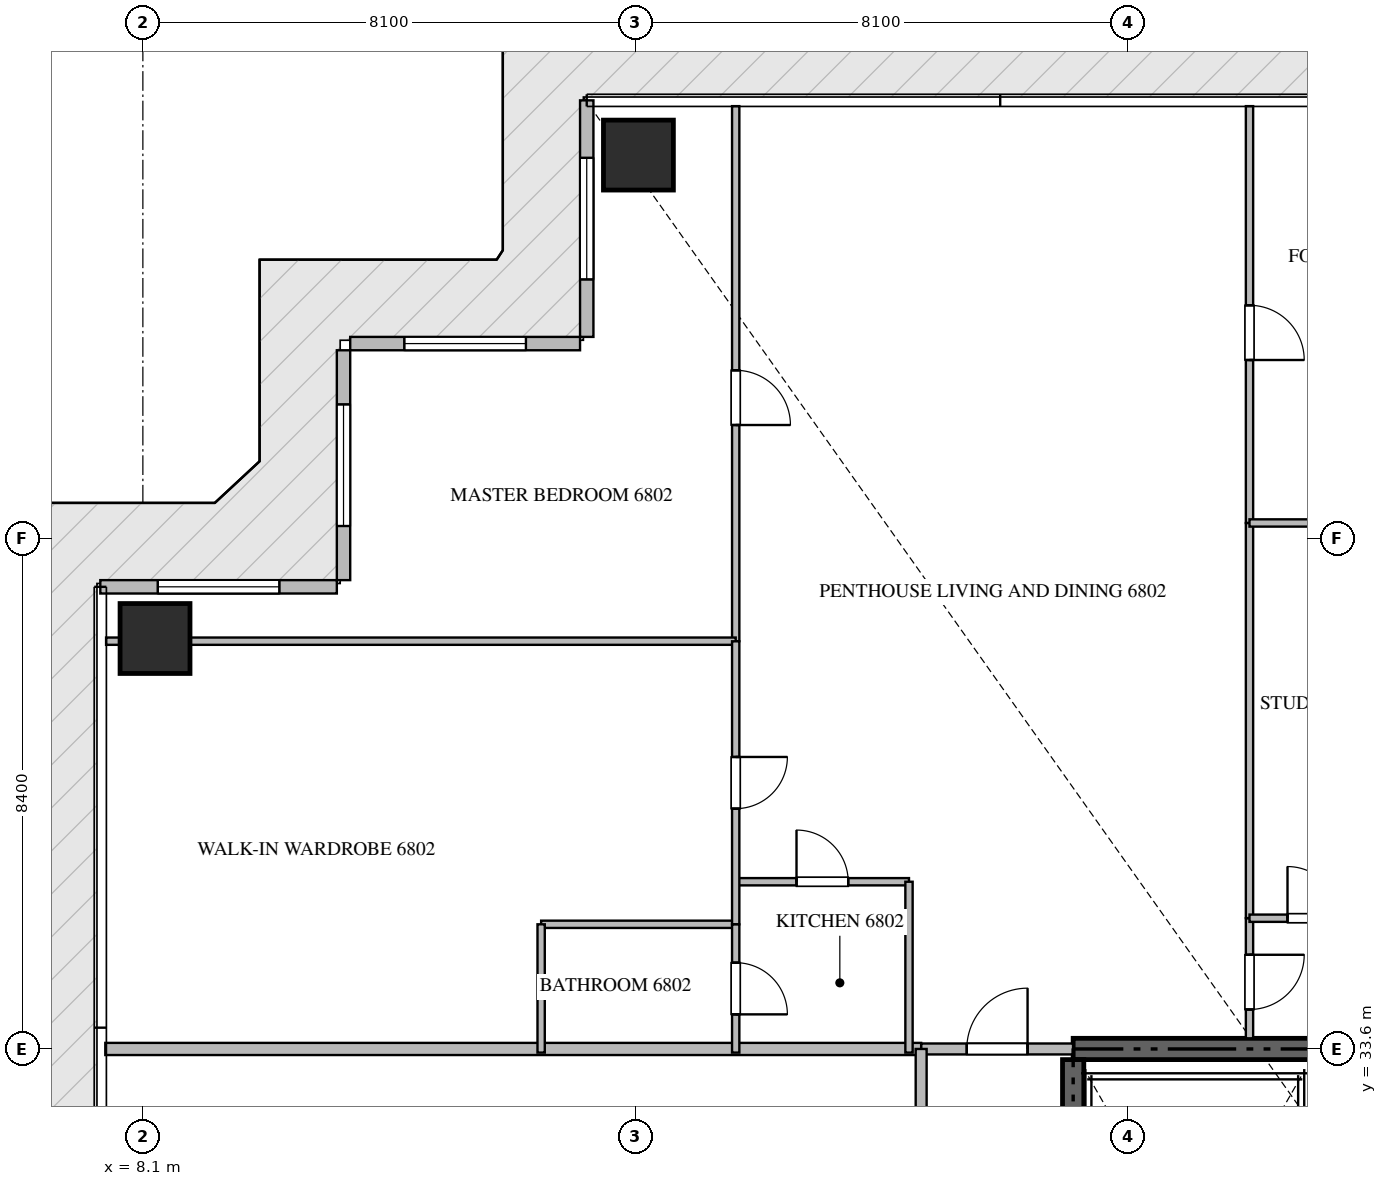
"""IFC4 building model, lengths in metres.
Left out: names, types, materials, properties, quantities, classifications, styles, units other than length and angle.
Written with IfcOpenShell. Run it as: python <this file> out.ifc"""

import sys

from ifc_helpers import new_model, si_unit, direction, frame, frame_2d, origin, origin_2d, place, context, subcontext, project, spatial, rectangle, extrude, source, transform, mapped, element, fill, save


model = new_model("IFC4")
c1 = context("Model", 3, precision=1e-05, world=origin(), true_north=direction((0.0, 1.0)))
c2 = subcontext(c1, "Body", "Model", "MODEL_VIEW")
j1 = project(units=[si_unit("LENGTHUNIT", "METRE"), si_unit("PLANEANGLEUNIT", "RADIAN")], contexts=[c1])
p1 = place(None, origin())
s1 = spatial("IfcSite", under=j1, at=p1, CompositionType="ELEMENT")
p2 = place(p1, origin())
s2 = spatial("IfcBuilding", under=s1, at=p2, CompositionType="ELEMENT")
p3 = place(p2, frame((0.0, 0.0, 272.05)))
s3 = spatial("IfcBuildingStorey", under=s2, at=p3, CompositionType="ELEMENT", Elevation=272.05)
p4 = place(p3, frame((41.4, 33.6, -0.26), z_axis=(0.0, 0.0, 1.0), x_axis=(-1.0, 0.0, 0.0)))
e1 = element("IfcWall", 1, at=p4, inside=s3, PredefinedType="SHEAR", context=c2, shape_type="SweptSolid", body=[
    extrude(rectangle(XDim=18.0, YDim=0.35, at=frame_2d((9.0, 0.0))), origin(), (0.0, 0.0, 1.0), 3.848),
])
p5 = place(p3, frame((23.4, 24.25, -0.26), z_axis=(0.0, 0.0, 1.0), x_axis=(0.0, 1.0, 0.0)))
e2 = element("IfcWall", 2, at=p5, inside=s3, PredefinedType="SHEAR", context=c2, shape_type="SweptSolid", body=[
    extrude(rectangle(XDim=9.175, YDim=0.35, at=frame_2d((4.587, 0.0))), origin(), (0.0, 0.0, 1.0), 3.848),
])
m1 = source(origin(), c2, "Body", "SweptSolid", [
    extrude(rectangle(XDim=1.15, YDim=1.15, at=origin_2d()), origin(), (0.0, 0.0, 1.0), 3.85),
])
for number, where, z_axis, x_axis in (
    (3, (16.25, 48.3, -0.26), (0.0, 0.0, 1.0), (1.0, 0.0, 0.0)),
    (4, (8.3, 40.35, -0.26), (0.0, 0.0, 1.0), (1.0, 0.0, 0.0)),
):
    element("IfcColumn", number, at=place(p3, frame(where, z_axis=z_axis, x_axis=x_axis)), inside=s3, PredefinedType="COLUMN", context=c2, shape_type="MappedRepresentation", body=[
        mapped(m1, transform((0.0, 0.0, 0.0), scale=1.0)),
    ])
p6 = place(p3, frame((15.4, 49.2, 0.0), z_axis=(0.0, 0.0, 1.0), x_axis=(0.0, -1.0, 0.0)))
e5 = element("IfcWall", 5, at=p6, inside=s3, PredefinedType="ELEMENTEDWALL", context=c2, shape_type="SweptSolid", body=[
    extrude(rectangle(XDim=3.89, YDim=0.22, at=frame_2d((1.945, 0.0))), origin(), (0.0, 0.0, 1.0), 3.575),
])
p7 = place(p6, frame((0.945, 0.0, 0.65)))
e6 = element("IfcOpeningElement", 6, at=p7, cuts=e5, PredefinedType="OPENING", context=c2, shape_type="SweptSolid", body=[
    extrude(rectangle(XDim=2.0, YDim=2.2, at=frame_2d((1.0, 1.1))), frame((0.0, 0.12, 0.0), z_axis=(0.0, -1.0, 0.0), x_axis=(1.0, 0.0, 0.0)), (0.0, 0.0, 1.0), 0.24),
])
p8 = place(p3, frame((15.29, 45.2, 0.0), z_axis=(0.0, 0.0, 1.0), x_axis=(-1.0, 0.0, 0.0)))
e7 = element("IfcWall", 7, at=p8, inside=s3, PredefinedType="ELEMENTEDWALL", context=c2, shape_type="SweptSolid", body=[
    extrude(rectangle(XDim=3.78, YDim=0.22, at=frame_2d((1.89, 0.0))), origin(), (0.0, 0.0, 1.0), 3.575),
])
p9 = place(p8, frame((0.89, 0.0, 0.65)))
e8 = element("IfcOpeningElement", 8, at=p9, cuts=e7, PredefinedType="OPENING", context=c2, shape_type="SweptSolid", body=[
    extrude(rectangle(XDim=2.0, YDim=2.2, at=frame_2d((1.0, 1.1))), frame((0.0, 0.12, 0.0), z_axis=(0.0, -1.0, 0.0), x_axis=(1.0, 0.0, 0.0)), (0.0, 0.0, 1.0), 0.24),
])
p10 = place(p3, frame((11.4, 45.09, 0.0), z_axis=(0.0, 0.0, 1.0), x_axis=(0.0, -1.0, 0.0)))
e9 = element("IfcWall", 9, at=p10, inside=s3, PredefinedType="ELEMENTEDWALL", context=c2, shape_type="SweptSolid", body=[
    extrude(rectangle(XDim=3.78, YDim=0.22, at=frame_2d((1.89, 0.0))), origin(), (0.0, 0.0, 1.0), 3.575),
])
p11 = place(p10, frame((0.89, 0.0, 0.65)))
e10 = element("IfcOpeningElement", 10, at=p11, cuts=e9, PredefinedType="OPENING", context=c2, shape_type="SweptSolid", body=[
    extrude(rectangle(XDim=2.0, YDim=2.2, at=frame_2d((1.0, 1.1))), frame((0.0, 0.12, 0.0), z_axis=(0.0, -1.0, 0.0), x_axis=(1.0, 0.0, 0.0)), (0.0, 0.0, 1.0), 0.24),
])
p12 = place(p3, frame((11.29, 41.2, 0.0), z_axis=(0.0, 0.0, 1.0), x_axis=(-1.0, 0.0, 0.0)))
e11 = element("IfcWall", 11, at=p12, inside=s3, PredefinedType="ELEMENTEDWALL", context=c2, shape_type="SweptSolid", body=[
    extrude(rectangle(XDim=3.89, YDim=0.22, at=frame_2d((1.945, 0.0))), origin(), (0.0, 0.0, 1.0), 3.575),
])
p13 = place(p12, frame((0.945, 0.0, 0.65)))
e12 = element("IfcOpeningElement", 12, at=p13, cuts=e11, PredefinedType="OPENING", context=c2, shape_type="SweptSolid", body=[
    extrude(rectangle(XDim=2.0, YDim=2.2, at=frame_2d((1.0, 1.1))), frame((0.0, 0.12, 0.0), z_axis=(0.0, -1.0, 0.0), x_axis=(1.0, 0.0, 0.0)), (0.0, 0.0, 1.0), 0.24),
])
p14 = place(p3, frame((7.482, 33.6, 0.0), z_axis=(0.0, 0.0, 1.0), x_axis=(1.0, 0.0, 0.0)))
e13 = element("IfcWall", 13, at=p14, inside=s3, PredefinedType="PARTITIONING", context=c2, shape_type="SweptSolid", body=[
    extrude(rectangle(XDim=13.418, YDim=0.2, at=frame_2d((6.709, 0.0))), origin(), (0.0, 0.0, 1.0), 3.59),
])
p15 = place(p3, frame((20.902, 33.6, 0.0), z_axis=(0.0, 0.0, 1.0), x_axis=(1.0, 0.0, 0.0)))
e14 = element("IfcWall", 14, at=p15, inside=s3, PredefinedType="PARTITIONING", context=c2, shape_type="SweptSolid", body=[
    extrude(rectangle(XDim=2.496, YDim=0.18, at=frame_2d((1.248, 0.0))), origin(), (0.0, 0.0, 1.0), 3.59),
])
p16 = place(p15, frame((0.748, 0.0, 0.0)))
e15 = element("IfcOpeningElement", 15, at=p16, cuts=e14, PredefinedType="OPENING", context=c2, shape_type="SweptSolid", body=[
    extrude(rectangle(XDim=1.0, YDim=2.15, at=frame_2d((0.5, 1.075))), frame((0.0, 0.1, 0.0), z_axis=(0.0, -1.0, 0.0), x_axis=(1.0, 0.0, 0.0)), (0.0, 0.0, 1.0), 0.2),
])
p17 = place(p3, frame((20.9, 16.8, 0.0), z_axis=(0.0, 0.0, 1.0), x_axis=(0.0, 1.0, 0.0)))
e16 = element("IfcWall", 16, at=p17, inside=s3, PredefinedType="PARTITIONING", context=c2, shape_type="SweptSolid", body=[
    extrude(rectangle(XDim=16.8, YDim=0.18, at=frame_2d((8.4, 0.0))), origin(), (0.0, 0.0, 1.0), 3.59),
])
p18 = place(p17, frame((3.018, 0.0, 0.0)))
e17 = element("IfcOpeningElement", 17, at=p18, cuts=e16, PredefinedType="OPENING", context=c2, shape_type="SweptSolid", body=[
    extrude(rectangle(XDim=1.0, YDim=2.15, at=frame_2d((0.5, 1.075))), frame((0.0, 0.1, 0.0), z_axis=(0.0, -1.0, 0.0), x_axis=(1.0, 0.0, 0.0)), (0.0, 0.0, 1.0), 0.2),
])
p19 = place(p17, frame((9.18, 0.0, 0.0)))
e18 = element("IfcOpeningElement", 18, at=p19, cuts=e16, PredefinedType="OPENING", context=c2, shape_type="SweptSolid", body=[
    extrude(rectangle(XDim=1.0, YDim=2.15, at=frame_2d((0.5, 1.075))), frame((0.0, 0.1, 0.0), z_axis=(0.0, -1.0, 0.0), x_axis=(1.0, 0.0, 0.0)), (0.0, 0.0, 1.0), 0.2),
])
p20 = place(p17, frame((14.5, 0.0, 0.0)))
e19 = element("IfcOpeningElement", 19, at=p20, cuts=e16, PredefinedType="OPENING", context=c2, shape_type="SweptSolid", body=[
    extrude(rectangle(XDim=1.0, YDim=2.15, at=frame_2d((0.5, 1.075))), frame((0.0, 0.1, 0.0), z_axis=(0.0, -1.0, 0.0), x_axis=(1.0, 0.0, 0.0)), (0.0, 0.0, 1.0), 0.2),
])
p21 = place(p3, frame((17.85, 36.35, 0.0), z_axis=(0.0, 0.0, 1.0), x_axis=(1.0, 0.0, 0.0)))
e20 = element("IfcWall", 20, at=p21, inside=s3, PredefinedType="PARTITIONING", context=c2, shape_type="SweptSolid", body=[
    extrude(rectangle(XDim=2.85, YDim=0.12, at=frame_2d((1.425, 0.0))), origin(), (0.0, 0.0, 1.0), 3.59),
])
p22 = place(p21, frame((1.0, 0.0, 0.0)))
e21 = element("IfcOpeningElement", 21, at=p22, cuts=e20, PredefinedType="OPENING", context=c2, shape_type="SweptSolid", body=[
    extrude(rectangle(XDim=0.85, YDim=2.1, at=frame_2d((0.425, 1.05))), frame((0.0, 0.07, 0.0), z_axis=(0.0, -1.0, 0.0), x_axis=(1.0, 0.0, 0.0)), (0.0, 0.0, 1.0), 0.14),
])
p23 = place(p3, frame((20.7, 36.35, 0.0), z_axis=(0.0, 0.0, 1.0), x_axis=(0.0, -1.0, 0.0)))
e22 = element("IfcWall", 22, at=p23, inside=s3, PredefinedType="PARTITIONING", context=c2, shape_type="SweptSolid", body=[
    extrude(rectangle(XDim=2.81, YDim=0.12, at=frame_2d((1.405, 0.0))), origin(), (0.0, 0.0, 1.0), 3.59),
])
p24 = place(p3, frame((17.85, 49.105, 0.0), z_axis=(0.0, 0.0, 1.0), x_axis=(0.0, -1.0, 0.0)))
e23 = element("IfcWall", 23, at=p24, inside=s3, PredefinedType="PARTITIONING", context=c2, shape_type="SweptSolid", body=[
    extrude(rectangle(XDim=8.799, YDim=0.12, at=frame_2d((4.399, 0.0))), origin(), (0.0, 0.0, 1.0), 3.59),
])
p25 = place(p24, frame((4.344, 0.0, 0.0)))
e24 = element("IfcOpeningElement", 24, at=p25, cuts=e23, PredefinedType="OPENING", context=c2, shape_type="SweptSolid", body=[
    extrude(rectangle(XDim=0.9, YDim=2.1, at=frame_2d((0.45, 1.05))), frame((0.0, 0.07, 0.0), z_axis=(0.0, -1.0, 0.0), x_axis=(1.0, 0.0, 0.0)), (0.0, 0.0, 1.0), 0.14),
])
p26 = place(p3, frame((7.495, 40.306, 0.0), z_axis=(0.0, 0.0, 1.0), x_axis=(1.0, 0.0, 0.0)))
e25 = element("IfcWall", 25, at=p26, inside=s3, PredefinedType="PARTITIONING", context=c2, shape_type="SweptSolid", body=[
    extrude(rectangle(XDim=10.355, YDim=0.12, at=frame_2d((5.177, 0.0))), origin(), (0.0, 0.0, 1.0), 3.122),
])
p27 = place(p3, frame((14.65, 35.65, 0.0), z_axis=(0.0, 0.0, 1.0), x_axis=(1.0, 0.0, 0.0)))
e26 = element("IfcWall", 26, at=p27, inside=s3, PredefinedType="PARTITIONING", context=c2, shape_type="SweptSolid", body=[
    extrude(rectangle(XDim=3.2, YDim=0.12, at=frame_2d((1.6, 0.0))), origin(), (0.0, 0.0, 1.0), 3.59),
])
p28 = place(p3, frame((14.65, 35.65, 0.0), z_axis=(0.0, 0.0, 1.0), x_axis=(0.0, -1.0, 0.0)))
e27 = element("IfcWall", 27, at=p28, inside=s3, PredefinedType="PARTITIONING", context=c2, shape_type="SweptSolid", body=[
    extrude(rectangle(XDim=2.11, YDim=0.12, at=frame_2d((1.055, 0.0))), origin(), (0.0, 0.0, 1.0), 3.59),
])
p29 = place(p3, frame((17.85, 40.304, 0.0), z_axis=(0.0, 0.0, 1.0), x_axis=(0.0, -1.0, 0.0)))
e28 = element("IfcWall", 28, at=p29, inside=s3, PredefinedType="PARTITIONING", context=c2, shape_type="SweptSolid", body=[
    extrude(rectangle(XDim=4.654, YDim=0.12, at=frame_2d((2.327, 0.0))), origin(), (0.0, 0.0, 1.0), 3.59),
])
p30 = place(p29, frame((1.902, 0.0, 0.0)))
e29 = element("IfcOpeningElement", 29, at=p30, cuts=e28, PredefinedType="OPENING", context=c2, shape_type="SweptSolid", body=[
    extrude(rectangle(XDim=0.85, YDim=2.1, at=frame_2d((0.425, 1.05))), frame((0.0, 0.07, 0.0), z_axis=(0.0, -1.0, 0.0), x_axis=(1.0, 0.0, 0.0)), (0.0, 0.0, 1.0), 0.14),
])
p31 = place(p3, frame((17.85, 35.648, 0.0), z_axis=(0.0, 0.0, 1.0), x_axis=(0.0, -1.0, 0.0)))
e30 = element("IfcWall", 30, at=p31, inside=s3, PredefinedType="PARTITIONING", context=c2, shape_type="SweptSolid", body=[
    extrude(rectangle(XDim=2.108, YDim=0.12, at=frame_2d((1.054, 0.0))), origin(), (0.0, 0.0, 1.0), 3.59),
])
p32 = place(p31, frame((0.629, 0.0, 0.0)))
e31 = element("IfcOpeningElement", 31, at=p32, cuts=e30, PredefinedType="OPENING", context=c2, shape_type="SweptSolid", body=[
    extrude(rectangle(XDim=0.85, YDim=2.1, at=frame_2d((0.425, 1.05))), frame((0.0, 0.07, 0.0), z_axis=(0.0, -1.0, 0.0), x_axis=(1.0, 0.0, 0.0)), (0.0, 0.0, 1.0), 0.14),
])
p33 = place(p3, frame((26.3, 35.75, 0.0), z_axis=(0.0, 0.0, 1.0), x_axis=(0.0, -1.0, 0.0)))
e32 = element("IfcWall", 32, at=p33, inside=s3, PredefinedType="PARTITIONING", context=c2, shape_type="SweptSolid", body=[
    extrude(rectangle(XDim=1.975, YDim=0.12, at=frame_2d((0.988, 0.0))), origin(), (0.0, 0.0, 1.0), 3.59),
])
p34 = place(p33, frame((0.601, 0.0, 0.0)))
e33 = element("IfcOpeningElement", 33, at=p34, cuts=e32, PredefinedType="OPENING", context=c2, shape_type="SweptSolid", body=[
    extrude(rectangle(XDim=0.9, YDim=2.1, at=frame_2d((0.45, 1.05))), frame((0.0, 0.07, 0.0), z_axis=(0.0, -1.0, 0.0), x_axis=(1.0, 0.0, 0.0)), (0.0, 0.0, 1.0), 0.14),
])
p35 = place(p3, frame((26.3, 49.105, 0.0), z_axis=(0.0, 0.0, 1.0), x_axis=(0.0, -1.0, 0.0)))
e34 = element("IfcWall", 34, at=p35, inside=s3, PredefinedType="PARTITIONING", context=c2, shape_type="SweptSolid", body=[
    extrude(rectangle(XDim=6.855, YDim=0.12, at=frame_2d((3.427, 0.0))), origin(), (0.0, 0.0, 1.0), 3.59),
])
p36 = place(p35, frame((3.275, 0.0, 0.0)))
e35 = element("IfcOpeningElement", 35, at=p36, cuts=e34, PredefinedType="OPENING", context=c2, shape_type="SweptSolid", body=[
    extrude(rectangle(XDim=0.9, YDim=2.1, at=frame_2d((0.45, 1.05))), frame((0.0, 0.07, 0.0), z_axis=(0.0, -1.0, 0.0), x_axis=(1.0, 0.0, 0.0)), (0.0, 0.0, 1.0), 0.14),
])
p37 = place(p3, frame((26.3, 42.248, 0.0), z_axis=(0.0, 0.0, 1.0), x_axis=(0.0, -1.0, 0.0)))
e36 = element("IfcWall", 36, at=p37, inside=s3, PredefinedType="PARTITIONING", context=c2, shape_type="SweptSolid", body=[
    extrude(rectangle(XDim=6.496, YDim=0.12, at=frame_2d((3.248, 0.0))), origin(), (0.0, 0.0, 1.0), 3.59),
])
p38 = place(p3, frame((26.3, 42.25, 0.0), z_axis=(0.0, 0.0, 1.0), x_axis=(1.0, 0.0, 0.0)))
e37 = element("IfcWall", 37, at=p38, inside=s3, PredefinedType="PARTITIONING", context=c2, shape_type="SweptSolid", body=[
    extrude(rectangle(XDim=5.15, YDim=0.12, at=frame_2d((2.575, 0.0))), origin(), (0.0, 0.0, 1.0), 3.59),
])
p39 = place(p3, frame((26.3, 35.75, 0.0), z_axis=(0.0, 0.0, 1.0), x_axis=(1.0, 0.0, 0.0)))
e38 = element("IfcWall", 38, at=p39, inside=s3, PredefinedType="PARTITIONING", context=c2, shape_type="SweptSolid", body=[
    extrude(rectangle(XDim=2.1, YDim=0.12, at=frame_2d((1.05, 0.0))), origin(), (0.0, 0.0, 1.0), 3.59),
])
p40 = place(p39, frame((0.625, 0.0, 0.0)))
e39 = element("IfcOpeningElement", 39, at=p40, cuts=e38, PredefinedType="OPENING", context=c2, shape_type="SweptSolid", body=[
    extrude(rectangle(XDim=0.85, YDim=2.1, at=frame_2d((0.425, 1.05))), frame((0.0, 0.07, 0.0), z_axis=(0.0, -1.0, 0.0), x_axis=(1.0, 0.0, 0.0)), (0.0, 0.0, 1.0), 0.14),
])
m2 = source(origin(), c2, "Body", "SweptSolid", [
    extrude(rectangle(XDim=2.0, YDim=2.2, at=frame_2d((1.0, 1.1))), frame((0.0, 0.03, 0.0), z_axis=(0.0, -1.0, 0.0), x_axis=(1.0, 0.0, 0.0)), (0.0, 0.0, 1.0), 0.06),
])
p41 = place(p7, origin())
e40 = element("IfcWindow", 40, at=p41, inside=s3, PartitioningType="SINGLE_PANEL", PredefinedType="WINDOW", context=c2, shape_type="MappedRepresentation", body=[
    mapped(m2, transform((0.0, 0.0, 0.0), scale=1.0)),
])
fill(e6, e40)
p42 = place(p9, origin())
e41 = element("IfcWindow", 41, at=p42, inside=s3, PartitioningType="SINGLE_PANEL", PredefinedType="WINDOW", context=c2, shape_type="MappedRepresentation", body=[
    mapped(m2, transform((0.0, 0.0, 0.0), scale=1.0)),
])
fill(e8, e41)
p43 = place(p11, origin())
e42 = element("IfcWindow", 42, at=p43, inside=s3, PartitioningType="SINGLE_PANEL", PredefinedType="WINDOW", context=c2, shape_type="MappedRepresentation", body=[
    mapped(m2, transform((0.0, 0.0, 0.0), scale=1.0)),
])
fill(e10, e42)
p44 = place(p13, origin())
e43 = element("IfcWindow", 43, at=p44, inside=s3, PartitioningType="SINGLE_PANEL", PredefinedType="WINDOW", context=c2, shape_type="MappedRepresentation", body=[
    mapped(m2, transform((0.0, 0.0, 0.0), scale=1.0)),
])
fill(e12, e43)
m3 = source(origin(), c2, "Body", "SweptSolid", [
    extrude(rectangle(XDim=1.0, YDim=2.15, at=frame_2d((0.5, 1.075))), frame((0.0, 0.025, 0.0), z_axis=(0.0, -1.0, 0.0), x_axis=(1.0, 0.0, 0.0)), (0.0, 0.0, 1.0), 0.05),
])
p45 = place(p16, origin())
e44 = element("IfcDoor", 44, at=p45, inside=s3, OperationType="SINGLE_SWING_RIGHT", PredefinedType="DOOR", context=c2, shape_type="MappedRepresentation", body=[
    mapped(m3, transform((0.0, 0.0, 0.0), scale=1.0)),
])
fill(e15, e44)
m4 = source(origin(), c2, "Body", "SweptSolid", [
    extrude(rectangle(XDim=0.85, YDim=2.1, at=frame_2d((0.425, 1.05))), frame((0.0, 0.025, 0.0), z_axis=(0.0, -1.0, 0.0), x_axis=(1.0, 0.0, 0.0)), (0.0, 0.0, 1.0), 0.05),
])
p46 = place(p22, origin())
e45 = element("IfcDoor", 45, at=p46, inside=s3, OperationType="SINGLE_SWING_LEFT", PredefinedType="DOOR", context=c2, shape_type="MappedRepresentation", body=[
    mapped(m4, transform((0.0, 0.0, 0.0), scale=1.0)),
])
fill(e21, e45)
m5 = source(origin(), c2, "Body", "SweptSolid", [
    extrude(rectangle(XDim=0.9, YDim=2.1, at=frame_2d((0.45, 1.05))), frame((0.0, 0.025, 0.0), z_axis=(0.0, -1.0, 0.0), x_axis=(1.0, 0.0, 0.0)), (0.0, 0.0, 1.0), 0.05),
])
p47 = place(p25, origin())
e46 = element("IfcDoor", 46, at=p47, inside=s3, OperationType="SINGLE_SWING_RIGHT", PredefinedType="DOOR", context=c2, shape_type="MappedRepresentation", body=[
    mapped(m5, transform((0.0, 0.0, 0.0), scale=1.0)),
])
fill(e24, e46)
p48 = place(p30, origin())
e47 = element("IfcDoor", 47, at=p48, inside=s3, OperationType="SINGLE_SWING_LEFT", PredefinedType="DOOR", context=c2, shape_type="MappedRepresentation", body=[
    mapped(m4, transform((0.0, 0.0, 0.0), scale=1.0)),
])
fill(e29, e47)
p49 = place(p32, origin())
e48 = element("IfcDoor", 48, at=p49, inside=s3, OperationType="SINGLE_SWING_RIGHT", PredefinedType="DOOR", context=c2, shape_type="MappedRepresentation", body=[
    mapped(m4, transform((0.0, 0.0, 0.0), scale=1.0)),
])
fill(e31, e48)
p50 = place(p34, origin())
e49 = element("IfcDoor", 49, at=p50, inside=s3, OperationType="SINGLE_SWING_LEFT", PredefinedType="DOOR", context=c2, shape_type="MappedRepresentation", body=[
    mapped(m5, transform((0.0, 0.0, 0.0), scale=1.0)),
])
fill(e33, e49)
p51 = place(p36, origin())
e50 = element("IfcDoor", 50, at=p51, inside=s3, OperationType="SINGLE_SWING_RIGHT", PredefinedType="DOOR", context=c2, shape_type="MappedRepresentation", body=[
    mapped(m5, transform((0.0, 0.0, 0.0), scale=1.0)),
])
fill(e35, e50)
p52 = place(p40, origin())
e51 = element("IfcDoor", 51, at=p52, inside=s3, OperationType="SINGLE_SWING_LEFT", PredefinedType="DOOR", context=c2, shape_type="MappedRepresentation", body=[
    mapped(m4, transform((0.0, 0.0, 0.0), scale=1.0)),
])
fill(e39, e51)
save(model, sys.argv[1])
